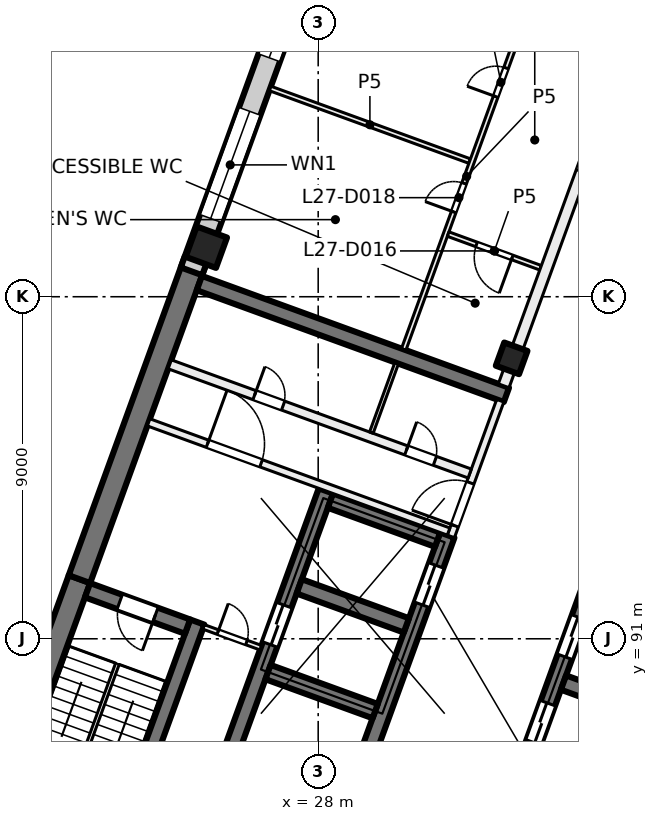
"""IFC4 building model, lengths in metres.
Left out: names, types, materials, properties, quantities, classifications, styles, units other than length and angle.
Written with IfcOpenShell. Run it as: python <this file> out.ifc"""

import sys

from ifc_helpers import new_model, si_unit, direction, frame, frame_2d, origin, origin_2d, place, context, subcontext, project, spatial, rectangle, extrude, element, fill, save


model = new_model("IFC4")
c1 = context("Model", 3, precision=1e-05, world=origin(), true_north=direction((0.0, 1.0)))
c2 = subcontext(c1, "Body", "Model", "MODEL_VIEW")
j1 = project(units=[si_unit("LENGTHUNIT", "METRE"), si_unit("PLANEANGLEUNIT", "RADIAN")], contexts=[c1])
p1 = place(None, origin())
s1 = spatial("IfcSite", under=j1, at=p1, CompositionType="ELEMENT")
p2 = place(p1, origin())
s2 = spatial("IfcBuilding", under=s1, at=p2, CompositionType="ELEMENT")
p3 = place(p2, frame((0.0, 0.0, 117.0)))
s3 = spatial("IfcBuildingStorey", under=s2, at=p3, CompositionType="ELEMENT", Elevation=117.0)
p4 = place(p3, frame((33.091, 98.379, 0.0), z_axis=(0.0, 0.0, 1.0), x_axis=(-0.342020143326, -0.939692620786, 0.0)))
e1 = element("IfcColumn", 1, at=p4, inside=s3, PredefinedType="COLUMN", context=c2, shape_type="SweptSolid", body=[
    extrude(rectangle(XDim=0.65, YDim=0.65, at=origin_2d()), origin(), (0.0, 0.0, 1.0), 4.0),
])
p5 = place(p3, frame((25.056, 101.303, 0.0), z_axis=(0.0, 0.0, 1.0), x_axis=(-0.342020143326, -0.939692620786, 0.0)))
e2 = element("IfcColumn", 2, at=p5, inside=s3, PredefinedType="COLUMN", context=c2, shape_type="SweptSolid", body=[
    extrude(rectangle(XDim=0.85, YDim=0.85, at=origin_2d()), origin(), (0.0, 0.0, 1.0), 4.0),
])
p6 = place(p3, frame((19.05, 85.239, 0.0), z_axis=(0.0, 0.0, 1.0), x_axis=(0.342016982193, 0.939693771338, 0.0)))
e3 = element("IfcWall", 3, at=p6, inside=s3, PredefinedType="SHEAR", context=c2, shape_type="SweptSolid", body=[
    extrude(rectangle(XDim=7.8, YDim=0.6, at=frame_2d((3.9, 0.0))), origin(), (0.0, 0.0, 1.0), 4.0),
])
p7 = place(p3, frame((21.717, 92.568, 0.0), z_axis=(0.0, 0.0, 1.0), x_axis=(0.342017595281, 0.939693548195, 0.0)))
e4 = element("IfcWall", 4, at=p7, inside=s3, PredefinedType="SHEAR", context=c2, shape_type="SweptSolid", body=[
    extrude(rectangle(XDim=8.925, YDim=0.6, at=frame_2d((4.462, 0.0))), origin(), (0.0, 0.0, 1.0), 4.0),
])
p8 = place(p3, frame((22.15, 84.11, 0.0), z_axis=(0.0, 0.0, 1.0), x_axis=(0.342016982193, 0.939693771338, 0.0)))
e5 = element("IfcWall", 5, at=p8, inside=s3, PredefinedType="SHEAR", context=c2, shape_type="SweptSolid", body=[
    extrude(rectangle(XDim=7.8, YDim=0.4, at=frame_2d((3.9, 0.0))), origin(), (0.0, 0.0, 1.0), 4.0),
])
p9 = place(p3, frame((24.562, 91.32, 0.0), z_axis=(0.0, 0.0, 1.0), x_axis=(-0.939717030584, 0.341953070509, 0.0)))
e6 = element("IfcWall", 6, at=p9, inside=s3, PredefinedType="SHEAR", context=c2, shape_type="SweptSolid", body=[
    extrude(rectangle(XDim=2.8, YDim=0.4, at=frame_2d((1.4, 0.0))), origin(), (0.0, 0.0, 1.0), 4.0),
])
p10 = place(p9, frame((0.9, 0.0, 0.0)))
e7 = element("IfcOpeningElement", 7, at=p10, cuts=e6, PredefinedType="OPENING", context=c2, shape_type="SweptSolid", body=[
    extrude(rectangle(XDim=1.0, YDim=2.1, at=frame_2d((0.5, 1.05))), frame((0.0, 0.21, 0.0), z_axis=(0.0, -1.0, 0.0), x_axis=(1.0, 0.0, 0.0)), (0.0, 0.0, 1.0), 0.42),
])
p11 = place(p3, frame((30.984, 80.895, 0.0), z_axis=(0.0, 0.0, 1.0), x_axis=(0.342021021735, 0.939692301071, 0.0)))
e8 = element("IfcWall", 8, at=p11, inside=s3, PredefinedType="SHEAR", context=c2, shape_type="SweptSolid", body=[
    extrude(rectangle(XDim=12.2, YDim=0.4, at=frame_2d((6.1, 0.0))), origin(), (0.0, 0.0, 1.0), 4.0),
])
p12 = place(p11, frame((5.45, 0.0, 0.0)))
e9 = element("IfcOpeningElement", 9, at=p12, cuts=e8, PredefinedType="OPENING", context=c2, shape_type="SweptSolid", body=[
    extrude(rectangle(XDim=1.1, YDim=2.1, at=frame_2d((0.55, 1.05))), frame((0.0, 0.21, 0.0), z_axis=(0.0, -1.0, 0.0), x_axis=(1.0, 0.0, 0.0)), (0.0, 0.0, 1.0), 0.42),
])
p13 = place(p11, frame((7.85, 0.0, 0.0)))
e10 = element("IfcOpeningElement", 10, at=p13, cuts=e8, PredefinedType="OPENING", context=c2, shape_type="SweptSolid", body=[
    extrude(rectangle(XDim=1.1, YDim=2.1, at=frame_2d((0.55, 1.05))), frame((0.0, 0.21, 0.0), z_axis=(0.0, -1.0, 0.0), x_axis=(1.0, 0.0, 0.0)), (0.0, 0.0, 1.0), 0.42),
])
p14 = place(p11, frame((10.25, 0.0, 0.0)))
e11 = element("IfcOpeningElement", 11, at=p14, cuts=e8, PredefinedType="OPENING", context=c2, shape_type="SweptSolid", body=[
    extrude(rectangle(XDim=1.1, YDim=2.1, at=frame_2d((0.55, 1.05))), frame((0.0, 0.21, 0.0), z_axis=(0.0, -1.0, 0.0), x_axis=(1.0, 0.0, 0.0)), (0.0, 0.0, 1.0), 0.42),
])
p15 = place(p3, frame((34.178, 79.732, 0.0), z_axis=(0.0, 0.0, 1.0), x_axis=(0.342014590177, 0.939694641948, 0.0)))
e12 = element("IfcWall", 12, at=p15, inside=s3, PredefinedType="SHEAR", context=c2, shape_type="SweptSolid", body=[
    extrude(rectangle(XDim=12.2, YDim=0.4, at=frame_2d((6.1, 0.0))), origin(), (0.0, 0.0, 1.0), 4.0),
])
p16 = place(p3, frame((37.274, 88.822, 0.0), z_axis=(0.0, 0.0, 1.0), x_axis=(-0.939686455819, 0.342037080957, 0.0)))
e13 = element("IfcWall", 13, at=p16, inside=s3, PredefinedType="SHEAR", context=c2, shape_type="SweptSolid", body=[
    extrude(rectangle(XDim=3.0, YDim=0.4, at=frame_2d((1.5, 0.0))), origin(), (0.0, 0.0, 1.0), 4.0),
])
p17 = place(p3, frame((27.225, 82.263, 0.0), z_axis=(0.0, 0.0, 1.0), x_axis=(0.342014590177, 0.939694641948, 0.0)))
e14 = element("IfcWall", 14, at=p17, inside=s3, PredefinedType="SHEAR", context=c2, shape_type="SweptSolid", body=[
    extrude(rectangle(XDim=12.2, YDim=0.4, at=frame_2d((6.1, 0.0))), origin(), (0.0, 0.0, 1.0), 4.0),
])
p18 = place(p17, frame((10.25, 0.0, 0.0)))
e15 = element("IfcOpeningElement", 15, at=p18, cuts=e14, PredefinedType="OPENING", context=c2, shape_type="SweptSolid", body=[
    extrude(rectangle(XDim=1.1, YDim=2.1, at=frame_2d((0.55, 1.05))), frame((0.0, 0.21, 0.0), z_axis=(0.0, -1.0, 0.0), x_axis=(1.0, 0.0, 0.0)), (0.0, 0.0, 1.0), 0.42),
])
p19 = place(p17, frame((0.6, 0.0, 0.0)))
e16 = element("IfcOpeningElement", 16, at=p19, cuts=e14, PredefinedType="OPENING", context=c2, shape_type="SweptSolid", body=[
    extrude(rectangle(XDim=1.0, YDim=2.1, at=frame_2d((0.5, 1.05))), frame((0.0, 0.21, 0.0), z_axis=(0.0, -1.0, 0.0), x_axis=(1.0, 0.0, 0.0)), (0.0, 0.0, 1.0), 0.42),
])
p20 = place(p3, frame((24.03, 83.426, 0.0), z_axis=(0.0, 0.0, 1.0), x_axis=(0.342014590177, 0.939694641948, 0.0)))
e17 = element("IfcWall", 17, at=p20, inside=s3, PredefinedType="SHEAR", context=c2, shape_type="SweptSolid", body=[
    extrude(rectangle(XDim=12.2, YDim=0.4, at=frame_2d((6.1, 0.0))), origin(), (0.0, 0.0, 1.0), 4.0),
])
p21 = place(p20, frame((7.9, 0.0, 0.0)))
e18 = element("IfcOpeningElement", 18, at=p21, cuts=e17, PredefinedType="OPENING", context=c2, shape_type="SweptSolid", body=[
    extrude(rectangle(XDim=1.1, YDim=2.1, at=frame_2d((0.55, 1.05))), frame((0.0, 0.21, 0.0), z_axis=(0.0, -1.0, 0.0), x_axis=(1.0, 0.0, 0.0)), (0.0, 0.0, 1.0), 0.42),
])
for number, where, z_axis, x_axis in (
    (19, (29.5, 89.097, 0.0), (0.0, 0.0, 1.0), (-0.94, 0.342, 0.0)),
    (20, (30.32, 91.353, 0.0), (0.0, 0.0, 1.0), (-0.94, 0.342, 0.0)),
    (21, (31.141, 93.608, 0.0), (0.0, 0.0, 1.0), (-0.94, 0.342, 0.0)),
):
    element("IfcWall", number, at=place(p3, frame(where, z_axis=z_axis, x_axis=x_axis)), inside=s3, PredefinedType="SHEAR", context=c2, shape_type="SweptSolid", body=[
        extrude(rectangle(XDim=3.0, YDim=0.4, at=frame_2d((1.5, 0.0))), origin(), (0.0, 0.0, 1.0), 4.0),
    ])
p22 = place(p3, frame((32.953, 97.418, 0.0), z_axis=(0.0, 0.0, 1.0), x_axis=(-0.93969060187, 0.342025690201, 0.0)))
e22 = element("IfcWall", 22, at=p22, inside=s3, PredefinedType="SHEAR", context=c2, shape_type="SweptSolid", body=[
    extrude(rectangle(XDim=8.6, YDim=0.4, at=frame_2d((4.3, 0.0))), origin(), (0.0, 0.0, 1.0), 4.0),
])
p23 = place(p3, frame((24.666, 100.669, 0.0), z_axis=(0.0, 0.0, 1.0), x_axis=(0.34201964167, 0.939692803373, 0.0)))
e23 = element("IfcWall", 23, at=p23, inside=s3, PredefinedType="SOLIDWALL", context=c2, shape_type="SweptSolid", body=[
    extrude(rectangle(XDim=32.884, YDim=0.6, at=frame_2d((16.442, 0.0))), origin(), (0.0, 0.0, 1.0), 3.625),
])
p24 = place(p23, frame((1.48, 0.0, 0.9)))
e24 = element("IfcOpeningElement", 24, at=p24, cuts=e23, PredefinedType="OPENING", context=c2, shape_type="SweptSolid", body=[
    extrude(rectangle(XDim=3.0, YDim=2.4, at=frame_2d((1.5, 1.2))), frame((0.0, 0.31, 0.0), z_axis=(0.0, -1.0, 0.0), x_axis=(1.0, 0.0, 0.0)), (0.0, 0.0, 1.0), 0.62),
])
p25 = place(p23, frame((5.98, 0.0, 0.9)))
e25 = element("IfcOpeningElement", 25, at=p25, cuts=e23, PredefinedType="OPENING", context=c2, shape_type="SweptSolid", body=[
    extrude(rectangle(XDim=3.0, YDim=2.4, at=frame_2d((1.5, 1.2))), frame((0.0, 0.31, 0.0), z_axis=(0.0, -1.0, 0.0), x_axis=(1.0, 0.0, 0.0)), (0.0, 0.0, 1.0), 0.62),
])
p26 = place(p23, frame((10.48, 0.0, 0.9)))
e26 = element("IfcOpeningElement", 26, at=p26, cuts=e23, PredefinedType="OPENING", context=c2, shape_type="SweptSolid", body=[
    extrude(rectangle(XDim=3.0, YDim=2.4, at=frame_2d((1.5, 1.2))), frame((0.0, 0.31, 0.0), z_axis=(0.0, -1.0, 0.0), x_axis=(1.0, 0.0, 0.0)), (0.0, 0.0, 1.0), 0.62),
])
p27 = place(p23, frame((14.98, 0.0, 0.9)))
e27 = element("IfcOpeningElement", 27, at=p27, cuts=e23, PredefinedType="OPENING", context=c2, shape_type="SweptSolid", body=[
    extrude(rectangle(XDim=3.0, YDim=2.4, at=frame_2d((1.5, 1.2))), frame((0.0, 0.31, 0.0), z_axis=(0.0, -1.0, 0.0), x_axis=(1.0, 0.0, 0.0)), (0.0, 0.0, 1.0), 0.62),
])
p28 = place(p23, frame((20.08, 0.0, 0.0)))
e28 = element("IfcOpeningElement", 28, at=p28, cuts=e23, PredefinedType="OPENING", context=c2, shape_type="SweptSolid", body=[
    extrude(rectangle(XDim=1.8, YDim=2.4, at=frame_2d((0.9, 1.2))), frame((0.0, 0.31, 0.0), z_axis=(0.0, -1.0, 0.0), x_axis=(1.0, 0.0, 0.0)), (0.0, 0.0, 1.0), 0.62),
])
p29 = place(p23, frame((23.98, 0.0, 0.9)))
e29 = element("IfcOpeningElement", 29, at=p29, cuts=e23, PredefinedType="OPENING", context=c2, shape_type="SweptSolid", body=[
    extrude(rectangle(XDim=3.0, YDim=2.4, at=frame_2d((1.5, 1.2))), frame((0.0, 0.31, 0.0), z_axis=(0.0, -1.0, 0.0), x_axis=(1.0, 0.0, 0.0)), (0.0, 0.0, 1.0), 0.62),
])
p30 = place(p23, frame((28.48, 0.0, 0.9)))
e30 = element("IfcOpeningElement", 30, at=p30, cuts=e23, PredefinedType="OPENING", context=c2, shape_type="SweptSolid", body=[
    extrude(rectangle(XDim=3.0, YDim=2.4, at=frame_2d((1.5, 1.2))), frame((0.0, 0.31, 0.0), z_axis=(0.0, -1.0, 0.0), x_axis=(1.0, 0.0, 0.0)), (0.0, 0.0, 1.0), 0.62),
])
p31 = place(p3, frame((31.491, 93.693, 0.0), z_axis=(0.0, 0.0, 1.0), x_axis=(0.341995824804, 0.939701471648, 0.0)))
e31 = element("IfcWall", 31, at=p31, inside=s3, PredefinedType="PARTITIONING", context=c2, shape_type="SweptSolid", body=[
    extrude(rectangle(XDim=3.8, YDim=0.2, at=frame_2d((1.9, 0.0))), origin(), (0.0, 0.0, 1.0), 3.625),
])
p32 = place(p31, frame((0.3, 0.0, 0.0)))
e32 = element("IfcOpeningElement", 32, at=p32, cuts=e31, PredefinedType="OPENING", context=c2, shape_type="SweptSolid", body=[
    extrude(rectangle(XDim=1.2, YDim=2.1, at=frame_2d((0.6, 1.05))), frame((0.0, 0.11, 0.0), z_axis=(0.0, -1.0, 0.0), x_axis=(1.0, 0.0, 0.0)), (0.0, 0.0, 1.0), 0.22),
])
p33 = place(p3, frame((23.538, 96.694, 0.0), z_axis=(0.0, 0.0, 1.0), x_axis=(0.939691552312, -0.342023078919, 0.0)))
e33 = element("IfcWall", 33, at=p33, inside=s3, PredefinedType="PARTITIONING", context=c2, shape_type="SweptSolid", body=[
    extrude(rectangle(XDim=8.4, YDim=0.2, at=frame_2d((4.2, 0.0))), origin(), (0.0, 0.0, 1.0), 3.625),
])
p34 = place(p33, frame((1.65, 0.0, 0.0)))
e34 = element("IfcOpeningElement", 34, at=p34, cuts=e33, PredefinedType="OPENING", context=c2, shape_type="SweptSolid", body=[
    extrude(rectangle(XDim=1.5, YDim=2.1, at=frame_2d((0.75, 1.05))), frame((0.0, 0.11, 0.0), z_axis=(0.0, -1.0, 0.0), x_axis=(1.0, 0.0, 0.0)), (0.0, 0.0, 1.0), 0.22),
])
p35 = place(p3, frame((24.094, 98.221, 0.0), z_axis=(0.0, 0.0, 1.0), x_axis=(0.939691552312, -0.342023078919, 0.0)))
e35 = element("IfcWall", 35, at=p35, inside=s3, PredefinedType="PARTITIONING", context=c2, shape_type="SweptSolid", body=[
    extrude(rectangle(XDim=8.4, YDim=0.25, at=frame_2d((4.2, 0.0))), origin(), (0.0, 0.0, 1.0), 3.625),
])
p36 = place(p35, frame((6.625, 0.0, 0.0)))
e36 = element("IfcOpeningElement", 36, at=p36, cuts=e35, PredefinedType="OPENING", context=c2, shape_type="SweptSolid", body=[
    extrude(rectangle(XDim=0.8, YDim=2.1, at=frame_2d((0.4, 1.05))), frame((0.0, 0.135, 0.0), z_axis=(0.0, -1.0, 0.0), x_axis=(1.0, 0.0, 0.0)), (0.0, 0.0, 1.0), 0.27),
])
p37 = place(p35, frame((2.375, 0.0, 0.0)))
e37 = element("IfcOpeningElement", 37, at=p37, cuts=e35, PredefinedType="OPENING", context=c2, shape_type="SweptSolid", body=[
    extrude(rectangle(XDim=0.8, YDim=2.1, at=frame_2d((0.4, 1.05))), frame((0.0, 0.135, 0.0), z_axis=(0.0, -1.0, 0.0), x_axis=(1.0, 0.0, 0.0)), (0.0, 0.0, 1.0), 0.27),
])
p38 = place(p3, frame((24.985, 91.312, 0.0), z_axis=(0.0, 0.0, 1.0), x_axis=(0.939708740826, -0.341975850632, 0.0)))
e38 = element("IfcWall", 38, at=p38, inside=s3, PredefinedType="PARTITIONING", context=c2, shape_type="SweptSolid", body=[
    extrude(rectangle(XDim=1.6, YDim=0.125, at=frame_2d((0.8, 0.0))), origin(), (0.0, 0.0, 1.0), 3.625),
])
p39 = place(p38, frame((0.4, 0.0, 0.0)))
e39 = element("IfcOpeningElement", 39, at=p39, cuts=e38, PredefinedType="OPENING", context=c2, shape_type="SweptSolid", body=[
    extrude(rectangle(XDim=0.8, YDim=2.1, at=frame_2d((0.4, 1.05))), frame((0.0, 0.073, 0.0), z_axis=(0.0, -1.0, 0.0), x_axis=(1.0, 0.0, 0.0)), (0.0, 0.0, 1.0), 0.145),
])
p40 = place(p3, frame((29.399, 96.424, 0.0), z_axis=(0.0, 0.0, 1.0), x_axis=(0.341913947243, 0.939731266204, 0.0)))
e40 = element("IfcWall", 40, at=p40, inside=s3, PredefinedType="PARTITIONING", context=c2, shape_type="SweptSolid", body=[
    extrude(rectangle(XDim=1.95, YDim=0.1, at=frame_2d((0.975, 0.0))), origin(), (0.0, 0.0, 1.0), 3.625),
])
p41 = place(p3, frame((26.736, 105.48, 0.0), z_axis=(0.0, 0.0, 1.0), x_axis=(0.939690035435, -0.342027246436, 0.0)))
e41 = element("IfcWall", 41, at=p41, inside=s3, PredefinedType="PARTITIONING", context=c2, shape_type="SweptSolid", body=[
    extrude(rectangle(XDim=5.587, YDim=0.125, at=frame_2d((2.793, 0.0))), origin(), (0.0, 0.0, 1.0), 3.625),
])
p42 = place(p3, frame((30.25, 98.615, 0.0), z_axis=(0.0, 0.0, 1.0), x_axis=(0.341998018937, 0.93970067311, 0.0)))
e42 = element("IfcWall", 42, at=p42, inside=s3, PredefinedType="PARTITIONING", context=c2, shape_type="SweptSolid", body=[
    extrude(rectangle(XDim=9.687, YDim=0.125, at=frame_2d((4.844, 0.0))), origin(), (0.0, 0.0, 1.0), 3.625),
])
p43 = place(p42, frame((7.078, 0.0, 0.0)))
e43 = element("IfcOpeningElement", 43, at=p43, cuts=e42, PredefinedType="OPENING", context=c2, shape_type="SweptSolid", body=[
    extrude(rectangle(XDim=0.8, YDim=2.1, at=frame_2d((0.4, 1.05))), frame((0.0, 0.073, 0.0), z_axis=(0.0, -1.0, 0.0), x_axis=(1.0, 0.0, 0.0)), (0.0, 0.0, 1.0), 0.145),
])
p44 = place(p42, frame((3.848, 0.0, 0.0)))
e44 = element("IfcOpeningElement", 44, at=p44, cuts=e42, PredefinedType="OPENING", context=c2, shape_type="SweptSolid", body=[
    extrude(rectangle(XDim=0.8, YDim=2.1, at=frame_2d((0.4, 1.05))), frame((0.0, 0.073, 0.0), z_axis=(0.0, -1.0, 0.0), x_axis=(1.0, 0.0, 0.0)), (0.0, 0.0, 1.0), 0.145),
])
p45 = place(p3, frame((33.852, 100.762, 0.0), z_axis=(0.0, 0.0, 1.0), x_axis=(-0.93959774877, 0.342280689649, 0.0)))
e45 = element("IfcWall", 45, at=p45, inside=s3, PredefinedType="PARTITIONING", context=c2, shape_type="SweptSolid", body=[
    extrude(rectangle(XDim=2.588, YDim=0.125, at=frame_2d((1.294, 0.0))), origin(), (0.0, 0.0, 1.0), 3.625),
])
p46 = place(p45, frame((0.794, 0.0, 0.0)))
e46 = element("IfcOpeningElement", 46, at=p46, cuts=e45, PredefinedType="OPENING", context=c2, shape_type="SweptSolid", body=[
    extrude(rectangle(XDim=1.0, YDim=2.1, at=frame_2d((0.5, 1.05))), frame((0.0, 0.073, 0.0), z_axis=(0.0, -1.0, 0.0), x_axis=(1.0, 0.0, 0.0)), (0.0, 0.0, 1.0), 0.145),
])
p47 = place(p3, frame((44.686, 130.091, 0.0), z_axis=(0.0, 0.0, 1.0), x_axis=(-0.342017360004, -0.939693633828, 0.0)))
e47 = element("IfcWall", 47, at=p47, inside=s3, PredefinedType="PARTITIONING", context=c2, shape_type="SweptSolid", body=[
    extrude(rectangle(XDim=34.516, YDim=0.3, at=frame_2d((17.258, 0.0))), origin(), (0.0, 0.0, 1.0), 3.625),
])
p48 = place(p47, frame((27.515, 0.0, 0.0)))
e48 = element("IfcOpeningElement", 48, at=p48, cuts=e47, PredefinedType="OPENING", context=c2, shape_type="SweptSolid", body=[
    extrude(rectangle(XDim=1.0, YDim=2.1, at=frame_2d((0.5, 1.05))), frame((0.0, 0.16, 0.0), z_axis=(0.0, -1.0, 0.0), x_axis=(1.0, 0.0, 0.0)), (0.0, 0.0, 1.0), 0.32),
])
p49 = place(p47, frame((16.865, 0.0, 0.0)))
e49 = element("IfcOpeningElement", 49, at=p49, cuts=e47, PredefinedType="OPENING", context=c2, shape_type="SweptSolid", body=[
    extrude(rectangle(XDim=1.8, YDim=2.1, at=frame_2d((0.9, 1.05))), frame((0.0, 0.16, 0.0), z_axis=(0.0, -1.0, 0.0), x_axis=(1.0, 0.0, 0.0)), (0.0, 0.0, 1.0), 0.32),
])
p50 = place(p47, frame((2.554, 0.0, 0.0)))
e50 = element("IfcOpeningElement", 50, at=p50, cuts=e47, PredefinedType="OPENING", context=c2, shape_type="SweptSolid", body=[
    extrude(rectangle(XDim=1.8, YDim=2.1, at=frame_2d((0.9, 1.05))), frame((0.0, 0.16, 0.0), z_axis=(0.0, -1.0, 0.0), x_axis=(1.0, 0.0, 0.0)), (0.0, 0.0, 1.0), 0.32),
])
p51 = place(p24, origin())
e51 = element("IfcWindow", 51, at=p51, inside=s3, PartitioningType="SINGLE_PANEL", PredefinedType="WINDOW", context=c2, shape_type="SweptSolid", body=[
    extrude(rectangle(XDim=3.0, YDim=2.4, at=frame_2d((1.5, 1.2))), frame((0.0, 0.03, 0.0), z_axis=(0.0, -1.0, 0.0), x_axis=(1.0, 0.0, 0.0)), (0.0, 0.0, 1.0), 0.06),
])
fill(e24, e51)
p52 = place(p25, origin())
e52 = element("IfcWindow", 52, at=p52, inside=s3, PartitioningType="SINGLE_PANEL", PredefinedType="WINDOW", context=c2, shape_type="SweptSolid", body=[
    extrude(rectangle(XDim=3.0, YDim=2.4, at=frame_2d((1.5, 1.2))), frame((0.0, 0.03, 0.0), z_axis=(0.0, -1.0, 0.0), x_axis=(1.0, 0.0, 0.0)), (0.0, 0.0, 1.0), 0.06),
])
fill(e25, e52)
p53 = place(p18, origin())
e53 = element("IfcDoor", 53, at=p53, inside=s3, OperationType="DOUBLE_DOOR_SLIDING", PredefinedType="DOOR", context=c2, shape_type="SweptSolid", body=[
    extrude(rectangle(XDim=1.1, YDim=2.1, at=frame_2d((0.55, 1.05))), frame((0.0, 0.025, 0.0), z_axis=(0.0, -1.0, 0.0), x_axis=(1.0, 0.0, 0.0)), (0.0, 0.0, 1.0), 0.05),
])
fill(e15, e53)
p54 = place(p13, origin())
e54 = element("IfcDoor", 54, at=p54, inside=s3, OperationType="DOUBLE_DOOR_SLIDING", PredefinedType="DOOR", context=c2, shape_type="SweptSolid", body=[
    extrude(rectangle(XDim=1.1, YDim=2.1, at=frame_2d((0.55, 1.05))), frame((0.0, 0.025, 0.0), z_axis=(0.0, -1.0, 0.0), x_axis=(1.0, 0.0, 0.0)), (0.0, 0.0, 1.0), 0.05),
])
fill(e10, e54)
p55 = place(p14, origin())
e55 = element("IfcDoor", 55, at=p55, inside=s3, OperationType="DOUBLE_DOOR_SLIDING", PredefinedType="DOOR", context=c2, shape_type="SweptSolid", body=[
    extrude(rectangle(XDim=1.1, YDim=2.1, at=frame_2d((0.55, 1.05))), frame((0.0, 0.025, 0.0), z_axis=(0.0, -1.0, 0.0), x_axis=(1.0, 0.0, 0.0)), (0.0, 0.0, 1.0), 0.05),
])
fill(e11, e55)
p56 = place(p32, origin())
e56 = element("IfcDoor", 56, at=p56, inside=s3, OperationType="DOUBLE_DOOR_SINGLE_SWING", PredefinedType="DOOR", context=c2, shape_type="SweptSolid", body=[
    extrude(rectangle(XDim=1.2, YDim=2.1, at=frame_2d((0.6, 1.05))), frame((0.0, 0.025, 0.0), z_axis=(0.0, -1.0, 0.0), x_axis=(1.0, 0.0, 0.0)), (0.0, 0.0, 1.0), 0.05),
])
fill(e32, e56)
p57 = place(p34, origin())
e57 = element("IfcDoor", 57, at=p57, inside=s3, OperationType="DOUBLE_DOOR_SINGLE_SWING", PredefinedType="DOOR", context=c2, shape_type="SweptSolid", body=[
    extrude(rectangle(XDim=1.5, YDim=2.1, at=frame_2d((0.75, 1.05))), frame((0.0, 0.025, 0.0), z_axis=(0.0, -1.0, 0.0), x_axis=(1.0, 0.0, 0.0)), (0.0, 0.0, 1.0), 0.05),
])
fill(e34, e57)
p58 = place(p10, origin())
e58 = element("IfcDoor", 58, at=p58, inside=s3, OperationType="SINGLE_SWING_LEFT", PredefinedType="DOOR", context=c2, shape_type="SweptSolid", body=[
    extrude(rectangle(XDim=1.0, YDim=2.1, at=frame_2d((0.5, 1.05))), frame((0.0, 0.025, 0.0), z_axis=(0.0, -1.0, 0.0), x_axis=(1.0, 0.0, 0.0)), (0.0, 0.0, 1.0), 0.05),
])
fill(e7, e58)
p59 = place(p39, origin())
e59 = element("IfcDoor", 59, at=p59, inside=s3, OperationType="SINGLE_SWING_RIGHT", PredefinedType="DOOR", context=c2, shape_type="SweptSolid", body=[
    extrude(rectangle(XDim=0.8, YDim=2.1, at=frame_2d((0.4, 1.05))), frame((0.0, 0.025, 0.0), z_axis=(0.0, -1.0, 0.0), x_axis=(1.0, 0.0, 0.0)), (0.0, 0.0, 1.0), 0.05),
])
fill(e39, e59)
p60 = place(p36, origin())
e60 = element("IfcDoor", 60, at=p60, inside=s3, OperationType="SINGLE_SWING_LEFT", PredefinedType="DOOR", context=c2, shape_type="SweptSolid", body=[
    extrude(rectangle(XDim=0.8, YDim=2.1, at=frame_2d((0.4, 1.05))), frame((0.0, 0.025, 0.0), z_axis=(0.0, -1.0, 0.0), x_axis=(1.0, 0.0, 0.0)), (0.0, 0.0, 1.0), 0.05),
])
fill(e36, e60)
p61 = place(p37, origin())
e61 = element("IfcDoor", 61, at=p61, inside=s3, OperationType="SINGLE_SWING_RIGHT", PredefinedType="DOOR", context=c2, shape_type="SweptSolid", body=[
    extrude(rectangle(XDim=0.8, YDim=2.1, at=frame_2d((0.4, 1.05))), frame((0.0, 0.025, 0.0), z_axis=(0.0, -1.0, 0.0), x_axis=(1.0, 0.0, 0.0)), (0.0, 0.0, 1.0), 0.05),
])
fill(e37, e61)
p62 = place(p21, origin())
e62 = element("IfcDoor", 62, at=p62, inside=s3, OperationType="DOUBLE_DOOR_SLIDING", PredefinedType="DOOR", context=c2, shape_type="SweptSolid", body=[
    extrude(rectangle(XDim=1.1, YDim=2.1, at=frame_2d((0.55, 1.05))), frame((0.0, 0.025, 0.0), z_axis=(0.0, -1.0, 0.0), x_axis=(1.0, 0.0, 0.0)), (0.0, 0.0, 1.0), 0.05),
])
fill(e18, e62)
p63 = place(p46, origin())
e63 = element("IfcDoor", 63, at=p63, inside=s3, OperationType="SINGLE_SWING_RIGHT", PredefinedType="DOOR", context=c2, shape_type="SweptSolid", body=[
    extrude(rectangle(XDim=1.0, YDim=2.1, at=frame_2d((0.5, 1.05))), frame((0.0, 0.025, 0.0), z_axis=(0.0, -1.0, 0.0), x_axis=(1.0, 0.0, 0.0)), (0.0, 0.0, 1.0), 0.05),
])
fill(e46, e63)
p64 = place(p43, origin())
e64 = element("IfcDoor", 64, at=p64, inside=s3, OperationType="SINGLE_SWING_RIGHT", PredefinedType="DOOR", context=c2, shape_type="SweptSolid", body=[
    extrude(rectangle(XDim=0.8, YDim=2.1, at=frame_2d((0.4, 1.05))), frame((0.0, 0.025, 0.0), z_axis=(0.0, -1.0, 0.0), x_axis=(1.0, 0.0, 0.0)), (0.0, 0.0, 1.0), 0.05),
])
fill(e43, e64)
p65 = place(p44, origin())
e65 = element("IfcDoor", 65, at=p65, inside=s3, OperationType="SINGLE_SWING_RIGHT", PredefinedType="DOOR", context=c2, shape_type="SweptSolid", body=[
    extrude(rectangle(XDim=0.8, YDim=2.1, at=frame_2d((0.4, 1.05))), frame((0.0, 0.025, 0.0), z_axis=(0.0, -1.0, 0.0), x_axis=(1.0, 0.0, 0.0)), (0.0, 0.0, 1.0), 0.05),
])
fill(e44, e65)
save(model, sys.argv[1])
